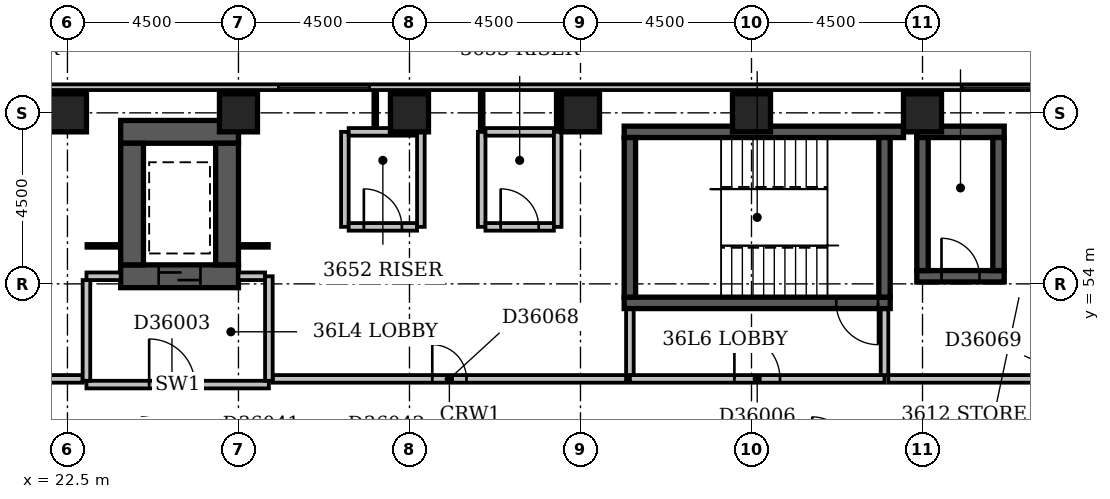
"""IFC4 building model, lengths in metres.
Left out: names, types, materials, properties, quantities, classifications, styles, units other than length and angle.
Written with IfcOpenShell. Run it as: python <this file> out.ifc"""

import sys

from ifc_helpers import new_model, si_unit, direction, frame, frame_2d, origin, origin_2d, place, context, subcontext, project, spatial, rectangle, extrude, element, fill, save


model = new_model("IFC4")
c1 = context("Model", 3, precision=1e-05, world=origin(), true_north=direction((0.0, 1.0)))
c2 = subcontext(c1, "Body", "Model", "MODEL_VIEW")
j1 = project(units=[si_unit("LENGTHUNIT", "METRE"), si_unit("PLANEANGLEUNIT", "RADIAN")], contexts=[c1])
p1 = place(None, origin())
s1 = spatial("IfcSite", under=j1, at=p1, CompositionType="ELEMENT")
p2 = place(p1, origin())
s2 = spatial("IfcBuilding", under=s1, at=p2, CompositionType="ELEMENT")
p3 = place(p2, frame((0.0, 0.0, 144.8)))
s3 = spatial("IfcBuildingStorey", under=s2, at=p3, CompositionType="ELEMENT", Elevation=144.8)
p4 = place(p3, frame((23.9, 54.2, -0.3), z_axis=(0.0, 0.0, 1.0), x_axis=(1.0, 0.0, 0.0)))
e1 = element("IfcWall", 1, at=p4, inside=s3, PredefinedType="SHEAR", context=c2, shape_type="SweptSolid", body=[
    extrude(rectangle(XDim=3.1, YDim=0.6, at=frame_2d((1.55, 0.0))), origin(), (0.0, 0.0, 1.0), 3.6),
])
p5 = place(p4, frame((1.0, 0.0, 0.3)))
e2 = element("IfcOpeningElement", 2, at=p5, cuts=e1, PredefinedType="OPENING", context=c2, shape_type="SweptSolid", body=[
    extrude(rectangle(XDim=1.1, YDim=2.1, at=frame_2d((0.55, 1.05))), frame((0.0, 0.312, 0.0), z_axis=(0.0, -1.0, 0.0), x_axis=(1.0, 0.0, 0.0)), (0.0, 0.0, 1.0), 0.624),
])
p6 = place(p3, frame((23.9, 58.0, -0.3), z_axis=(0.0, 0.0, 1.0), x_axis=(1.0, 0.0, 0.0)))
e3 = element("IfcWall", 3, at=p6, inside=s3, PredefinedType="SHEAR", context=c2, shape_type="SweptSolid", body=[
    extrude(rectangle(XDim=3.1, YDim=0.6, at=frame_2d((1.55, 0.0))), origin(), (0.0, 0.0, 1.0), 3.6),
])
for number, where, z_axis, x_axis in (
    (4, (24.2, 54.5, -0.3), (0.0, 0.0, 1.0), (0.0, 1.0, 0.0)),
    (5, (26.7, 54.5, -0.3), (0.0, 0.0, 1.0), (0.0, 1.0, 0.0)),
):
    element("IfcWall", number, at=place(p3, frame(where, z_axis=z_axis, x_axis=x_axis)), inside=s3, PredefinedType="SHEAR", context=c2, shape_type="SweptSolid", body=[
        extrude(rectangle(XDim=3.2, YDim=0.6, at=frame_2d((1.6, 0.0))), origin(), (0.0, 0.0, 1.0), 3.6),
    ])
p7 = place(p3, frame((37.15, 53.5, -0.3), z_axis=(0.0, 0.0, 1.0), x_axis=(1.0, 0.0, 0.0)))
e6 = element("IfcWall", 6, at=p7, inside=s3, PredefinedType="SHEAR", context=c2, shape_type="SweptSolid", body=[
    extrude(rectangle(XDim=7.0, YDim=0.3, at=frame_2d((3.5, 0.0))), origin(), (0.0, 0.0, 1.0), 3.6),
])
p8 = place(p7, frame((5.58, 0.0, 0.3)))
e7 = element("IfcOpeningElement", 7, at=p8, cuts=e6, PredefinedType="OPENING", context=c2, shape_type="SweptSolid", body=[
    extrude(rectangle(XDim=1.1, YDim=2.1, at=frame_2d((0.55, 1.05))), frame((0.0, 0.162, 0.0), z_axis=(0.0, -1.0, 0.0), x_axis=(1.0, 0.0, 0.0)), (0.0, 0.0, 1.0), 0.324),
])
p9 = place(p3, frame((37.15, 58.0, -0.3), z_axis=(0.0, 0.0, 1.0), x_axis=(1.0, 0.0, 0.0)))
e8 = element("IfcWall", 8, at=p9, inside=s3, PredefinedType="SHEAR", context=c2, shape_type="SweptSolid", body=[
    extrude(rectangle(XDim=7.35, YDim=0.3, at=frame_2d((3.675, 0.0))), origin(), (0.0, 0.0, 1.0), 3.6),
])
for number, where, z_axis, x_axis in (
    (9, (37.3, 53.65, -0.3), (0.0, 0.0, 1.0), (0.0, 1.0, 0.0)),
    (10, (44.0, 53.65, -0.3), (0.0, 0.0, 1.0), (0.0, 1.0, 0.0)),
):
    element("IfcWall", number, at=place(p3, frame(where, z_axis=z_axis, x_axis=x_axis)), inside=s3, PredefinedType="SHEAR", context=c2, shape_type="SweptSolid", body=[
        extrude(rectangle(XDim=4.2, YDim=0.3, at=frame_2d((2.1, 0.0))), origin(), (0.0, 0.0, 1.0), 3.6),
    ])
p10 = place(p3, frame((44.85, 54.2, -0.3), z_axis=(0.0, 0.0, 1.0), x_axis=(1.0, 0.0, 0.0)))
e11 = element("IfcWall", 11, at=p10, inside=s3, PredefinedType="SHEAR", context=c2, shape_type="SweptSolid", body=[
    extrude(rectangle(XDim=2.3, YDim=0.3, at=frame_2d((1.15, 0.0))), origin(), (0.0, 0.0, 1.0), 3.6),
])
p11 = place(p10, frame((0.65, 0.0, 0.3)))
e12 = element("IfcOpeningElement", 12, at=p11, cuts=e11, PredefinedType="OPENING", context=c2, shape_type="SweptSolid", body=[
    extrude(rectangle(XDim=1.0, YDim=2.1, at=frame_2d((0.5, 1.05))), frame((0.0, 0.162, 0.0), z_axis=(0.0, -1.0, 0.0), x_axis=(1.0, 0.0, 0.0)), (0.0, 0.0, 1.0), 0.324),
])
p12 = place(p3, frame((44.85, 58.0, -0.3), z_axis=(0.0, 0.0, 1.0), x_axis=(1.0, 0.0, 0.0)))
e13 = element("IfcWall", 13, at=p12, inside=s3, PredefinedType="SHEAR", context=c2, shape_type="SweptSolid", body=[
    extrude(rectangle(XDim=2.3, YDim=0.3, at=frame_2d((1.15, 0.0))), origin(), (0.0, 0.0, 1.0), 3.6),
])
for number, where, z_axis, x_axis in (
    (14, (45.0, 54.35, -0.3), (0.0, 0.0, 1.0), (0.0, 1.0, 0.0)),
    (15, (47.0, 54.35, -0.3), (0.0, 0.0, 1.0), (0.0, 1.0, 0.0)),
):
    element("IfcWall", number, at=place(p3, frame(where, z_axis=z_axis, x_axis=x_axis)), inside=s3, PredefinedType="SHEAR", context=c2, shape_type="SweptSolid", body=[
        extrude(rectangle(XDim=3.5, YDim=0.3, at=frame_2d((1.75, 0.0))), origin(), (0.0, 0.0, 1.0), 3.6),
    ])
for number, where, z_axis, x_axis in (
    (16, (22.5, 58.5, -0.3), (0.0, 0.0, 1.0), (1.0, 0.0, 0.0)),
    (17, (27.0, 58.5, -0.3), (0.0, 0.0, 1.0), (1.0, 0.0, 0.0)),
    (18, (31.5, 58.5, -0.3), (0.0, 0.0, 1.0), (1.0, 0.0, 0.0)),
    (19, (36.0, 58.5, -0.3), (0.0, 0.0, 1.0), (1.0, 0.0, 0.0)),
    (20, (40.5, 58.5, -0.3), (0.0, 0.0, 1.0), (1.0, 0.0, 0.0)),
    (21, (45.0, 58.5, -0.3), (0.0, 0.0, 1.0), (1.0, 0.0, 0.0)),
):
    element("IfcColumn", number, at=place(p3, frame(where, z_axis=z_axis, x_axis=x_axis)), inside=s3, PredefinedType="COLUMN", context=c2, shape_type="SweptSolid", body=[
        extrude(rectangle(XDim=1.0, YDim=1.0, at=origin_2d()), origin(), (0.0, 0.0, 1.0), 3.6),
    ])
p13 = place(p3, frame((68.1, 59.175, 0.0), z_axis=(0.0, 0.0, 1.0), x_axis=(-1.0, 0.0, 0.0)))
e22 = element("IfcWall", 22, at=p13, inside=s3, PredefinedType="STANDARD", context=c2, shape_type="SweptSolid", body=[
    extrude(rectangle(XDim=68.85, YDim=0.15, at=frame_2d((34.425, 0.0))), origin(), (0.0, 0.0, 1.0), 2.7),
])
p14 = place(p13, frame((15.15, 0.0, 0.6)))
e23 = element("IfcOpeningElement", 23, at=p14, cuts=e22, PredefinedType="OPENING", context=c2, shape_type="SweptSolid", body=[
    extrude(rectangle(XDim=2.4, YDim=1.8, at=frame_2d((1.2, 0.9))), frame((0.0, 0.087, 0.0), z_axis=(0.0, -1.0, 0.0), x_axis=(1.0, 0.0, 0.0)), (0.0, 0.0, 1.0), 0.174),
])
p15 = place(p13, frame((19.65, 0.0, 0.6)))
e24 = element("IfcOpeningElement", 24, at=p15, cuts=e22, PredefinedType="OPENING", context=c2, shape_type="SweptSolid", body=[
    extrude(rectangle(XDim=2.4, YDim=1.8, at=frame_2d((1.2, 0.9))), frame((0.0, 0.087, 0.0), z_axis=(0.0, -1.0, 0.0), x_axis=(1.0, 0.0, 0.0)), (0.0, 0.0, 1.0), 0.174),
])
p16 = place(p13, frame((37.65, 0.0, 0.6)))
e25 = element("IfcOpeningElement", 25, at=p16, cuts=e22, PredefinedType="OPENING", context=c2, shape_type="SweptSolid", body=[
    extrude(rectangle(XDim=2.4, YDim=1.8, at=frame_2d((1.2, 0.9))), frame((0.0, 0.087, 0.0), z_axis=(0.0, -1.0, 0.0), x_axis=(1.0, 0.0, 0.0)), (0.0, 0.0, 1.0), 0.174),
])
p17 = place(p3, frame((23.0, 51.35, 0.0), z_axis=(0.0, 0.0, 1.0), x_axis=(1.0, 0.0, 0.0)))
e26 = element("IfcWall", 26, at=p17, inside=s3, PredefinedType="PARTITIONING", context=c2, shape_type="SweptSolid", body=[
    extrude(rectangle(XDim=4.8, YDim=0.2, at=frame_2d((2.4, 0.0))), origin(), (0.0, 0.0, 1.0), 3.3),
])
p18 = place(p17, frame((1.65, 0.0, 0.0)))
e27 = element("IfcOpeningElement", 27, at=p18, cuts=e26, PredefinedType="OPENING", context=c2, shape_type="SweptSolid", body=[
    extrude(rectangle(XDim=1.2, YDim=2.1, at=frame_2d((0.6, 1.05))), frame((0.0, 0.112, 0.0), z_axis=(0.0, -1.0, 0.0), x_axis=(1.0, 0.0, 0.0)), (0.0, 0.0, 1.0), 0.224),
])
p19 = place(p3, frame((27.8, 51.45, 0.0), z_axis=(0.0, 0.0, 1.0), x_axis=(0.0, 1.0, 0.0)))
e28 = element("IfcWall", 28, at=p19, inside=s3, PredefinedType="PARTITIONING", context=c2, shape_type="SweptSolid", body=[
    extrude(rectangle(XDim=2.75, YDim=0.2, at=frame_2d((1.375, 0.0))), origin(), (0.0, 0.0, 1.0), 3.3),
])
p20 = place(p3, frame((23.0, 54.2, 0.0), z_axis=(0.0, 0.0, 1.0), x_axis=(1.0, 0.0, 0.0)))
e29 = element("IfcWall", 29, at=p20, inside=s3, PredefinedType="PARTITIONING", context=c2, shape_type="SweptSolid", body=[
    extrude(rectangle(XDim=0.9, YDim=0.2, at=frame_2d((0.45, 0.0))), origin(), (0.0, 0.0, 1.0), 3.3),
])
p21 = place(p3, frame((27.0, 54.2, 0.0), z_axis=(0.0, 0.0, 1.0), x_axis=(1.0, 0.0, 0.0)))
e30 = element("IfcWall", 30, at=p21, inside=s3, PredefinedType="PARTITIONING", context=c2, shape_type="SweptSolid", body=[
    extrude(rectangle(XDim=0.7, YDim=0.2, at=frame_2d((0.35, 0.0))), origin(), (0.0, 0.0, 1.0), 3.3),
])
p22 = place(p3, frame((23.0, 51.45, 0.0), z_axis=(0.0, 0.0, 1.0), x_axis=(0.0, 1.0, 0.0)))
e31 = element("IfcWall", 31, at=p22, inside=s3, PredefinedType="PARTITIONING", context=c2, shape_type="SweptSolid", body=[
    extrude(rectangle(XDim=2.65, YDim=0.2, at=frame_2d((1.325, 0.0))), origin(), (0.0, 0.0, 1.0), 3.3),
])
p23 = place(p3, frame((37.3, 51.5, 0.0), z_axis=(0.0, 0.0, 1.0), x_axis=(1.0, 0.0, 0.0)))
e32 = element("IfcWall", 32, at=p23, inside=s3, PredefinedType="PARTITIONING", context=c2, shape_type="SweptSolid", body=[
    extrude(rectangle(XDim=6.7, YDim=0.2, at=frame_2d((3.35, 0.0))), origin(), (0.0, 0.0, 1.0), 3.3),
])
p24 = place(p23, frame((2.75, 0.0, 0.0)))
e33 = element("IfcOpeningElement", 33, at=p24, cuts=e32, PredefinedType="OPENING", context=c2, shape_type="SweptSolid", body=[
    extrude(rectangle(XDim=1.2, YDim=2.1, at=frame_2d((0.6, 1.05))), frame((0.0, 0.112, 0.0), z_axis=(0.0, -1.0, 0.0), x_axis=(1.0, 0.0, 0.0)), (0.0, 0.0, 1.0), 0.224),
])
for number, where, z_axis, x_axis in (
    (34, (44.0, 51.6, 0.0), (0.0, 0.0, 1.0), (0.0, 1.0, 0.0)),
    (35, (37.3, 51.6, 0.0), (0.0, 0.0, 1.0), (0.0, 1.0, 0.0)),
):
    element("IfcWall", number, at=place(p3, frame(where, z_axis=z_axis, x_axis=x_axis)), inside=s3, PredefinedType="PARTITIONING", context=c2, shape_type="SweptSolid", body=[
        extrude(rectangle(XDim=1.73, YDim=0.2, at=frame_2d((0.865, 0.0))), origin(), (0.0, 0.0, 1.0), 3.3),
    ])
p25 = place(p3, frame((7.6, 51.5, 0.0), z_axis=(0.0, 0.0, 1.0), x_axis=(1.0, 0.0, 0.0)))
e36 = element("IfcWall", 36, at=p25, inside=s3, PredefinedType="PARTITIONING", context=c2, shape_type="SweptSolid", body=[
    extrude(rectangle(XDim=15.3, YDim=0.2, at=frame_2d((7.65, 0.0))), origin(), (0.0, 0.0, 1.0), 3.3),
])
p26 = place(p25, frame((7.2, 0.0, 0.0)))
e37 = element("IfcOpeningElement", 37, at=p26, cuts=e36, PredefinedType="OPENING", context=c2, shape_type="SweptSolid", body=[
    extrude(rectangle(XDim=0.9, YDim=2.1, at=frame_2d((0.45, 1.05))), frame((0.0, 0.112, 0.0), z_axis=(0.0, -1.0, 0.0), x_axis=(1.0, 0.0, 0.0)), (0.0, 0.0, 1.0), 0.224),
])
p27 = place(p3, frame((27.9, 51.5, 0.0), z_axis=(0.0, 0.0, 1.0), x_axis=(1.0, 0.0, 0.0)))
e38 = element("IfcWall", 38, at=p27, inside=s3, PredefinedType="PARTITIONING", context=c2, shape_type="SweptSolid", body=[
    extrude(rectangle(XDim=9.3, YDim=0.2, at=frame_2d((4.65, 0.0))), origin(), (0.0, 0.0, 1.0), 3.3),
])
p28 = place(p27, frame((4.2, 0.0, 0.0)))
e39 = element("IfcOpeningElement", 39, at=p28, cuts=e38, PredefinedType="OPENING", context=c2, shape_type="SweptSolid", body=[
    extrude(rectangle(XDim=0.9, YDim=2.1, at=frame_2d((0.45, 1.05))), frame((0.0, 0.112, 0.0), z_axis=(0.0, -1.0, 0.0), x_axis=(1.0, 0.0, 0.0)), (0.0, 0.0, 1.0), 0.224),
])
p29 = place(p3, frame((44.1, 51.5, 0.0), z_axis=(0.0, 0.0, 1.0), x_axis=(1.0, 0.0, 0.0)))
e40 = element("IfcWall", 40, at=p29, inside=s3, PredefinedType="PARTITIONING", context=c2, shape_type="SweptSolid", body=[
    extrude(rectangle(XDim=9.8, YDim=0.2, at=frame_2d((4.9, 0.0))), origin(), (0.0, 0.0, 1.0), 3.3),
])
p30 = place(p29, frame((4.45, 0.0, 0.0)))
e41 = element("IfcOpeningElement", 41, at=p30, cuts=e40, PredefinedType="OPENING", context=c2, shape_type="SweptSolid", body=[
    extrude(rectangle(XDim=0.9, YDim=2.1, at=frame_2d((0.45, 1.05))), frame((0.0, 0.112, 0.0), z_axis=(0.0, -1.0, 0.0), x_axis=(1.0, 0.0, 0.0)), (0.0, 0.0, 1.0), 0.224),
])
p31 = place(p3, frame((23.0, 55.0, 0.0), z_axis=(0.0, 0.0, 1.0), x_axis=(1.0, 0.0, 0.0)))
e42 = element("IfcWall", 42, at=p31, inside=s3, PredefinedType="PARTITIONING", context=c2, shape_type="SweptSolid", body=[
    extrude(rectangle(XDim=0.9, YDim=0.1, at=frame_2d((0.45, 0.0))), origin(), (0.0, 0.0, 1.0), 3.3),
])
p32 = place(p3, frame((27.0, 55.0, 0.0), z_axis=(0.0, 0.0, 1.0), x_axis=(1.0, 0.0, 0.0)))
e43 = element("IfcWall", 43, at=p32, inside=s3, PredefinedType="PARTITIONING", context=c2, shape_type="SweptSolid", body=[
    extrude(rectangle(XDim=0.8, YDim=0.1, at=frame_2d((0.4, 0.0))), origin(), (0.0, 0.0, 1.0), 3.3),
])
p33 = place(p3, frame((29.8, 55.5, 0.0), z_axis=(0.0, 0.0, 1.0), x_axis=(0.0, 1.0, 0.0)))
e44 = element("IfcWall", 44, at=p33, inside=s3, PredefinedType="PARTITIONING", context=c2, shape_type="SweptSolid", body=[
    extrude(rectangle(XDim=2.5, YDim=0.2, at=frame_2d((1.25, 0.0))), origin(), (0.0, 0.0, 1.0), 3.3),
])
p34 = place(p3, frame((29.9, 55.5, 0.0), z_axis=(0.0, 0.0, 1.0), x_axis=(1.0, 0.0, 0.0)))
e45 = element("IfcWall", 45, at=p34, inside=s3, PredefinedType="PARTITIONING", context=c2, shape_type="SweptSolid", body=[
    extrude(rectangle(XDim=1.8, YDim=0.2, at=frame_2d((0.9, 0.0))), origin(), (0.0, 0.0, 1.0), 3.3),
])
p35 = place(p34, frame((0.4, 0.0, 0.0)))
e46 = element("IfcOpeningElement", 46, at=p35, cuts=e45, PredefinedType="OPENING", context=c2, shape_type="SweptSolid", body=[
    extrude(rectangle(XDim=1.0, YDim=2.1, at=frame_2d((0.5, 1.05))), frame((0.0, 0.112, 0.0), z_axis=(0.0, -1.0, 0.0), x_axis=(1.0, 0.0, 0.0)), (0.0, 0.0, 1.0), 0.224),
])
for number, where, z_axis, x_axis in (
    (47, (31.8, 55.5, 0.0), (0.0, 0.0, 1.0), (0.0, 1.0, 0.0)),
    (48, (33.4, 55.5, 0.0), (0.0, 0.0, 1.0), (0.0, 1.0, 0.0)),
):
    element("IfcWall", number, at=place(p3, frame(where, z_axis=z_axis, x_axis=x_axis)), inside=s3, PredefinedType="PARTITIONING", context=c2, shape_type="SweptSolid", body=[
        extrude(rectangle(XDim=2.5, YDim=0.2, at=frame_2d((1.25, 0.0))), origin(), (0.0, 0.0, 1.0), 3.3),
    ])
p36 = place(p3, frame((33.5, 55.5, 0.0), z_axis=(0.0, 0.0, 1.0), x_axis=(1.0, 0.0, 0.0)))
e49 = element("IfcWall", 49, at=p36, inside=s3, PredefinedType="PARTITIONING", context=c2, shape_type="SweptSolid", body=[
    extrude(rectangle(XDim=1.8, YDim=0.2, at=frame_2d((0.9, 0.0))), origin(), (0.0, 0.0, 1.0), 3.3),
])
p37 = place(p36, frame((0.4, 0.0, 0.0)))
e50 = element("IfcOpeningElement", 50, at=p37, cuts=e49, PredefinedType="OPENING", context=c2, shape_type="SweptSolid", body=[
    extrude(rectangle(XDim=1.0, YDim=2.1, at=frame_2d((0.5, 1.05))), frame((0.0, 0.112, 0.0), z_axis=(0.0, -1.0, 0.0), x_axis=(1.0, 0.0, 0.0)), (0.0, 0.0, 1.0), 0.224),
])
p38 = place(p3, frame((35.4, 55.5, 0.0), z_axis=(0.0, 0.0, 1.0), x_axis=(0.0, 1.0, 0.0)))
e51 = element("IfcWall", 51, at=p38, inside=s3, PredefinedType="PARTITIONING", context=c2, shape_type="SweptSolid", body=[
    extrude(rectangle(XDim=2.5, YDim=0.2, at=frame_2d((1.25, 0.0))), origin(), (0.0, 0.0, 1.0), 2.4),
])
p39 = place(p3, frame((29.9, 58.0, 0.0), z_axis=(0.0, 0.0, 1.0), x_axis=(1.0, 0.0, 0.0)))
e52 = element("IfcWall", 52, at=p39, inside=s3, PredefinedType="PARTITIONING", context=c2, shape_type="SweptSolid", body=[
    extrude(rectangle(XDim=1.8, YDim=0.2, at=frame_2d((0.9, 0.0))), origin(), (0.0, 0.0, 1.0), 3.3),
])
p40 = place(p3, frame((33.4, 58.0, 0.0), z_axis=(0.0, 0.0, 1.0), x_axis=(0.0, 1.0, 0.0)))
e53 = element("IfcWall", 53, at=p40, inside=s3, PredefinedType="PARTITIONING", context=c2, shape_type="SweptSolid", body=[
    extrude(rectangle(XDim=1.1, YDim=0.1, at=frame_2d((0.55, 0.0))), origin(), (0.0, 0.0, 1.0), 3.3),
])
p41 = place(p3, frame((33.5, 58.0, 0.0), z_axis=(0.0, 0.0, 1.0), x_axis=(1.0, 0.0, 0.0)))
e54 = element("IfcWall", 54, at=p41, inside=s3, PredefinedType="PARTITIONING", context=c2, shape_type="SweptSolid", body=[
    extrude(rectangle(XDim=1.8, YDim=0.2, at=frame_2d((0.9, 0.0))), origin(), (0.0, 0.0, 1.0), 3.3),
])
p42 = place(p3, frame((35.4, 58.0, 0.0), z_axis=(0.0, 0.0, 1.0), x_axis=(0.0, 1.0, 0.0)))
e55 = element("IfcWall", 55, at=p42, inside=s3, PredefinedType="PARTITIONING", context=c2, shape_type="SweptSolid", body=[
    extrude(rectangle(XDim=1.1, YDim=0.1, at=frame_2d((0.55, 0.0))), origin(), (0.0, 0.0, 1.0), 2.4),
])
p43 = place(p3, frame((30.6, 58.1, 0.0), z_axis=(0.0, 0.0, 1.0), x_axis=(0.0, 1.0, 0.0)))
e56 = element("IfcWall", 56, at=p43, inside=s3, PredefinedType="PARTITIONING", context=c2, shape_type="SweptSolid", body=[
    extrude(rectangle(XDim=1.0, YDim=0.1, at=frame_2d((0.5, 0.0))), origin(), (0.0, 0.0, 1.0), 3.3),
])
p44 = place(p15, origin())
e57 = element("IfcWindow", 57, at=p44, inside=s3, PartitioningType="SINGLE_PANEL", PredefinedType="WINDOW", context=c2, shape_type="SweptSolid", body=[
    extrude(rectangle(XDim=2.4, YDim=1.8, at=frame_2d((1.2, 0.9))), frame((0.0, 0.03, 0.0), z_axis=(0.0, -1.0, 0.0), x_axis=(1.0, 0.0, 0.0)), (0.0, 0.0, 1.0), 0.06),
])
fill(e24, e57)
p45 = place(p16, origin())
e58 = element("IfcWindow", 58, at=p45, inside=s3, PartitioningType="SINGLE_PANEL", PredefinedType="WINDOW", context=c2, shape_type="SweptSolid", body=[
    extrude(rectangle(XDim=2.4, YDim=1.8, at=frame_2d((1.2, 0.9))), frame((0.0, 0.03, 0.0), z_axis=(0.0, -1.0, 0.0), x_axis=(1.0, 0.0, 0.0)), (0.0, 0.0, 1.0), 0.06),
])
fill(e25, e58)
p46 = place(p18, origin())
e59 = element("IfcDoor", 59, at=p46, inside=s3, OperationType="SINGLE_SWING_LEFT", PredefinedType="DOOR", context=c2, shape_type="SweptSolid", body=[
    extrude(rectangle(XDim=1.2, YDim=2.1, at=frame_2d((0.6, 1.05))), frame((0.0, 0.025, 0.0), z_axis=(0.0, -1.0, 0.0), x_axis=(1.0, 0.0, 0.0)), (0.0, 0.0, 1.0), 0.05),
])
fill(e27, e59)
p47 = place(p5, origin())
e60 = element("IfcDoor", 60, at=p47, inside=s3, OperationType="SLIDING_TO_LEFT", PredefinedType="DOOR", context=c2, shape_type="SweptSolid", body=[
    extrude(rectangle(XDim=1.1, YDim=2.1, at=frame_2d((0.55, 1.05))), frame((0.0, 0.025, 0.0), z_axis=(0.0, -1.0, 0.0), x_axis=(1.0, 0.0, 0.0)), (0.0, 0.0, 1.0), 0.05),
])
fill(e2, e60)
p48 = place(p24, origin())
e61 = element("IfcDoor", 61, at=p48, inside=s3, OperationType="SINGLE_SWING_LEFT", PredefinedType="DOOR", context=c2, shape_type="SweptSolid", body=[
    extrude(rectangle(XDim=1.2, YDim=2.1, at=frame_2d((0.6, 1.05))), frame((0.0, 0.025, 0.0), z_axis=(0.0, -1.0, 0.0), x_axis=(1.0, 0.0, 0.0)), (0.0, 0.0, 1.0), 0.05),
])
fill(e33, e61)
p49 = place(p11, origin())
e62 = element("IfcDoor", 62, at=p49, inside=s3, OperationType="SINGLE_SWING_LEFT", PredefinedType="DOOR", context=c2, shape_type="SweptSolid", body=[
    extrude(rectangle(XDim=1.0, YDim=2.1, at=frame_2d((0.5, 1.05))), frame((0.0, 0.025, 0.0), z_axis=(0.0, -1.0, 0.0), x_axis=(1.0, 0.0, 0.0)), (0.0, 0.0, 1.0), 0.05),
])
fill(e12, e62)
p50 = place(p8, origin())
e63 = element("IfcDoor", 63, at=p50, inside=s3, OperationType="SINGLE_SWING_RIGHT", PredefinedType="DOOR", context=c2, shape_type="SweptSolid", body=[
    extrude(rectangle(XDim=1.1, YDim=2.1, at=frame_2d((0.55, 1.05))), frame((0.0, 0.025, 0.0), z_axis=(0.0, -1.0, 0.0), x_axis=(1.0, 0.0, 0.0)), (0.0, 0.0, 1.0), 0.05),
])
fill(e7, e63)
p51 = place(p28, origin())
e64 = element("IfcDoor", 64, at=p51, inside=s3, OperationType="SINGLE_SWING_LEFT", PredefinedType="DOOR", context=c2, shape_type="SweptSolid", body=[
    extrude(rectangle(XDim=0.9, YDim=2.1, at=frame_2d((0.45, 1.05))), frame((0.0, 0.025, 0.0), z_axis=(0.0, -1.0, 0.0), x_axis=(1.0, 0.0, 0.0)), (0.0, 0.0, 1.0), 0.05),
])
fill(e39, e64)
p52 = place(p35, origin())
e65 = element("IfcDoor", 65, at=p52, inside=s3, OperationType="SINGLE_SWING_LEFT", PredefinedType="DOOR", context=c2, shape_type="SweptSolid", body=[
    extrude(rectangle(XDim=1.0, YDim=2.1, at=frame_2d((0.5, 1.05))), frame((0.0, 0.025, 0.0), z_axis=(0.0, -1.0, 0.0), x_axis=(1.0, 0.0, 0.0)), (0.0, 0.0, 1.0), 0.05),
])
fill(e46, e65)
p53 = place(p37, origin())
e66 = element("IfcDoor", 66, at=p53, inside=s3, OperationType="SINGLE_SWING_LEFT", PredefinedType="DOOR", context=c2, shape_type="SweptSolid", body=[
    extrude(rectangle(XDim=1.0, YDim=2.1, at=frame_2d((0.5, 1.05))), frame((0.0, 0.025, 0.0), z_axis=(0.0, -1.0, 0.0), x_axis=(1.0, 0.0, 0.0)), (0.0, 0.0, 1.0), 0.05),
])
fill(e50, e66)
save(model, sys.argv[1])
